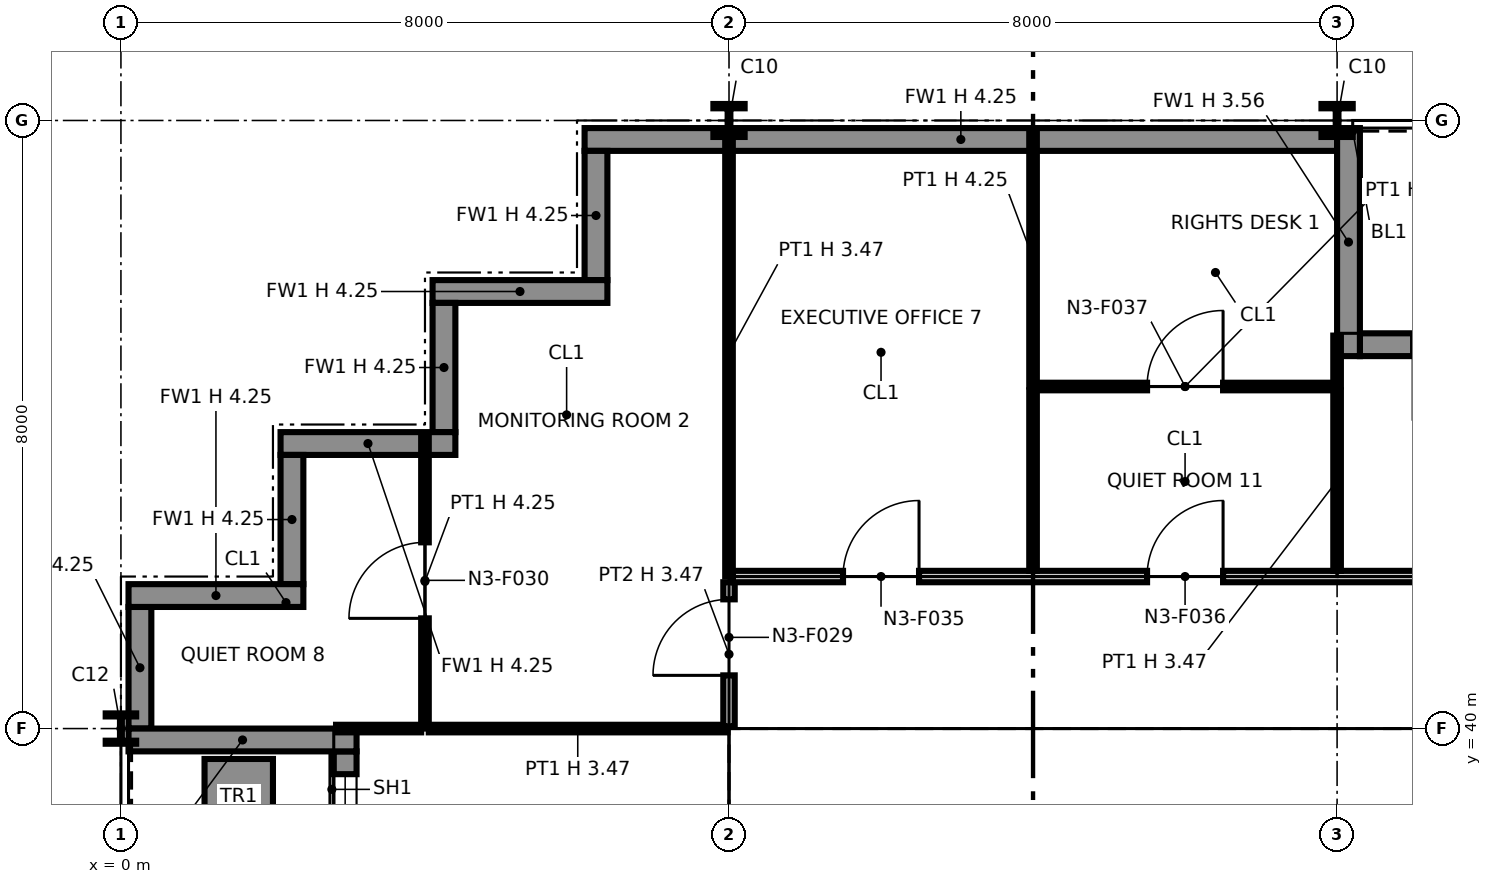
"""IFC4 building model, lengths in metres.
Left out: names, types, materials, properties, quantities, classifications, styles, units other than length and angle.
Written with IfcOpenShell. Run it as: python <this file> out.ifc"""

import sys

from ifc_helpers import new_model, si_unit, direction, frame, frame_2d, origin, origin_2d, place, context, subcontext, project, spatial, polyline, rectangle, i_section, outline, extrude, element, fill, save


model = new_model("IFC4")
c1 = context("Model", 3, precision=1e-05, world=origin(), true_north=direction((0.0, 1.0)))
c2 = subcontext(c1, "Body", "Model", "MODEL_VIEW")
j1 = project(units=[si_unit("LENGTHUNIT", "METRE"), si_unit("PLANEANGLEUNIT", "RADIAN")], contexts=[c1])
p1 = place(None, origin())
s1 = spatial("IfcSite", under=j1, at=p1, CompositionType="ELEMENT")
p2 = place(p1, origin())
s2 = spatial("IfcBuilding", under=s1, at=p2, CompositionType="ELEMENT")
p3 = place(p2, frame((0.0, 0.0, 65.6)))
s3 = spatial("IfcBuildingStorey", under=s2, at=p3, CompositionType="ELEMENT", Elevation=65.6)
p4 = place(p3, frame((0.0, 40.0, 0.0), z_axis=(0.0, 0.0, 1.0), x_axis=(1.0, 0.0, 0.0)))
e1 = element("IfcColumn", 1, at=p4, inside=s3, PredefinedType="COLUMN", context=c2, shape_type="SweptSolid", body=[
    extrude(i_section(OverallWidth=0.401, OverallDepth=0.399, WebThickness=0.025, FlangeThickness=0.04, at=origin_2d()), origin(), (0.0, 0.0, 1.0), 4.25),
])
p5 = place(p3, frame((8.0, 40.0, 0.0), z_axis=(0.0, 0.0, 1.0), x_axis=(1.0, 0.0, 0.0)))
e2 = element("IfcColumn", 2, at=p5, inside=s3, PredefinedType="COLUMN", context=c2, shape_type="SweptSolid", body=[
    extrude(i_section(OverallWidth=0.394, OverallDepth=0.376, WebThickness=0.017, FlangeThickness=0.028, at=origin_2d()), origin(), (0.0, 0.0, 1.0), 4.25),
])
p6 = place(p3, frame((8.0, 48.0, 0.0), z_axis=(0.0, 0.0, 1.0), x_axis=(1.0, 0.0, 0.0)))
e3 = element("IfcColumn", 3, at=p6, inside=s3, PredefinedType="COLUMN", context=c2, shape_type="SweptSolid", body=[
    extrude(i_section(OverallWidth=0.411, OverallDepth=0.434, WebThickness=0.036, FlangeThickness=0.057, at=origin_2d()), origin(), (0.0, 0.0, 1.0), 4.25),
])
p7 = place(p3, frame((16.0, 40.0, 0.0), z_axis=(0.0, 0.0, 1.0), x_axis=(1.0, 0.0, 0.0)))
e4 = element("IfcColumn", 4, at=p7, inside=s3, PredefinedType="COLUMN", context=c2, shape_type="SweptSolid", body=[
    extrude(i_section(OverallWidth=0.394, OverallDepth=0.376, WebThickness=0.017, FlangeThickness=0.028, at=origin_2d()), origin(), (0.0, 0.0, 1.0), 4.25),
])
p8 = place(p3, frame((16.0, 48.0, 0.0), z_axis=(0.0, 0.0, 1.0), x_axis=(1.0, 0.0, 0.0)))
e5 = element("IfcColumn", 5, at=p8, inside=s3, PredefinedType="COLUMN", context=c2, shape_type="SweptSolid", body=[
    extrude(i_section(OverallWidth=0.411, OverallDepth=0.434, WebThickness=0.036, FlangeThickness=0.057, at=origin_2d()), origin(), (0.0, 0.0, 1.0), 4.25),
])
p9 = place(p3, frame((0.25, 41.6, 0.0), z_axis=(0.0, 0.0, 1.0), x_axis=(0.0, -1.0, 0.0)))
e6 = element("IfcWall", 6, at=p9, inside=s3, PredefinedType="SOLIDWALL", context=c2, shape_type="SweptSolid", body=[
    extrude(rectangle(XDim=1.6, YDim=0.3, at=frame_2d((0.8, 0.0))), origin(), (0.0, 0.0, 1.0), 4.25),
])
p10 = place(p3, frame((2.95, 39.7, 0.0), z_axis=(0.0, 0.0, 1.0), x_axis=(0.0, -1.0, 0.0)))
e7 = element("IfcWall", 7, at=p10, inside=s3, PredefinedType="SOLIDWALL", context=c2, shape_type="SweptSolid", body=[
    extrude(rectangle(XDim=7.4, YDim=0.3, at=frame_2d((3.7, 0.0))), origin(), (0.0, 0.0, 1.0), 4.25),
])
p11 = place(p10, frame((0.3, 0.0, 0.9)))
e8 = element("IfcOpeningElement", 8, at=p11, cuts=e7, PredefinedType="OPENING", context=c2, shape_type="SweptSolid", body=[
    extrude(rectangle(XDim=2.8, YDim=2.2, at=frame_2d((1.4, 1.1))), frame((0.0, 0.16, 0.0), z_axis=(0.0, -1.0, 0.0), x_axis=(1.0, 0.0, 0.0)), (0.0, 0.0, 1.0), 0.32),
])
p12 = place(p10, frame((4.7, 0.0, 0.0)))
e9 = element("IfcOpeningElement", 9, at=p12, cuts=e7, PredefinedType="OPENING", context=c2, shape_type="SweptSolid", body=[
    extrude(rectangle(XDim=2.0, YDim=2.4, at=frame_2d((1.0, 1.2))), frame((0.0, 0.16, 0.0), z_axis=(0.0, -1.0, 0.0), x_axis=(1.0, 0.0, 0.0)), (0.0, 0.0, 1.0), 0.32),
])
p13 = place(p3, frame((0.1, 39.85, 0.0), z_axis=(0.0, 0.0, 1.0), x_axis=(1.0, 0.0, 0.0)))
e10 = element("IfcWall", 10, at=p13, inside=s3, PredefinedType="SOLIDWALL", context=c2, shape_type="SweptSolid", body=[
    extrude(rectangle(XDim=3.0, YDim=0.3, at=frame_2d((1.5, 0.0))), origin(), (0.0, 0.0, 1.0), 3.469),
])
p14 = place(p3, frame((1.55, 39.6, 0.0), z_axis=(0.0, 0.0, 1.0), x_axis=(0.0, -1.0, 0.0)))
e11 = element("IfcWall", 11, at=p14, inside=s3, PredefinedType="SOLIDWALL", context=c2, shape_type="SweptSolid", body=[
    extrude(rectangle(XDim=3.2, YDim=0.9, at=frame_2d((1.6, 0.0))), origin(), (0.0, 0.0, 1.0), 0.6),
])
p15 = place(p3, frame((23.7, 45.05, 0.0), z_axis=(0.0, 0.0, 1.0), x_axis=(-1.0, 0.0, 0.0)))
e12 = element("IfcWall", 12, at=p15, inside=s3, PredefinedType="SOLIDWALL", context=c2, shape_type="SweptSolid", body=[
    extrude(rectangle(XDim=7.4, YDim=0.3, at=frame_2d((3.7, 0.0))), origin(), (0.0, 0.0, 1.0), 4.25),
])
p16 = place(p15, frame((0.3, 0.0, 0.9)))
e13 = element("IfcOpeningElement", 13, at=p16, cuts=e12, PredefinedType="OPENING", context=c2, shape_type="SweptSolid", body=[
    extrude(rectangle(XDim=2.8, YDim=2.2, at=frame_2d((1.4, 1.1))), frame((0.0, 0.16, 0.0), z_axis=(0.0, -1.0, 0.0), x_axis=(1.0, 0.0, 0.0)), (0.0, 0.0, 1.0), 0.32),
])
p17 = place(p15, frame((4.7, 0.0, 0.0)))
e14 = element("IfcOpeningElement", 14, at=p17, cuts=e12, PredefinedType="OPENING", context=c2, shape_type="SweptSolid", body=[
    extrude(rectangle(XDim=2.0, YDim=2.4, at=frame_2d((1.0, 1.2))), frame((0.0, 0.16, 0.0), z_axis=(0.0, -1.0, 0.0), x_axis=(1.0, 0.0, 0.0)), (0.0, 0.0, 1.0), 0.32),
])
p18 = place(p3, frame((16.15, 47.9, 0.0), z_axis=(0.0, 0.0, 1.0), x_axis=(0.0, -1.0, 0.0)))
e15 = element("IfcWall", 15, at=p18, inside=s3, PredefinedType="SOLIDWALL", context=c2, shape_type="SweptSolid", body=[
    extrude(rectangle(XDim=3.0, YDim=0.3, at=frame_2d((1.5, 0.0))), origin(), (0.0, 0.0, 1.0), 3.556),
])
p19 = place(p3, frame((16.0, 47.75, 0.0), z_axis=(0.0, 0.0, 1.0), x_axis=(-1.0, 0.0, 0.0)))
e16 = element("IfcWall", 16, at=p19, inside=s3, PredefinedType="SOLIDWALL", context=c2, shape_type="SweptSolid", body=[
    extrude(rectangle(XDim=9.9, YDim=0.3, at=frame_2d((4.95, 0.0))), origin(), (0.0, 0.0, 1.0), 4.25),
])
p20 = place(p3, frame((6.25, 47.6, 0.0), z_axis=(0.0, 0.0, 1.0), x_axis=(0.0, -1.0, 0.0)))
e17 = element("IfcWall", 17, at=p20, inside=s3, PredefinedType="SOLIDWALL", context=c2, shape_type="SweptSolid", body=[
    extrude(rectangle(XDim=1.7, YDim=0.3, at=frame_2d((0.85, 0.0))), origin(), (0.0, 0.0, 1.0), 4.25),
])
p21 = place(p3, frame((6.4, 45.75, 0.0), z_axis=(0.0, 0.0, 1.0), x_axis=(-1.0, 0.0, 0.0)))
e18 = element("IfcWall", 18, at=p21, inside=s3, PredefinedType="SOLIDWALL", context=c2, shape_type="SweptSolid", body=[
    extrude(rectangle(XDim=2.3, YDim=0.3, at=frame_2d((1.15, 0.0))), origin(), (0.0, 0.0, 1.0), 4.25),
])
p22 = place(p3, frame((4.25, 45.6, 0.0), z_axis=(0.0, 0.0, 1.0), x_axis=(0.0, -1.0, 0.0)))
e19 = element("IfcWall", 19, at=p22, inside=s3, PredefinedType="SOLIDWALL", context=c2, shape_type="SweptSolid", body=[
    extrude(rectangle(XDim=1.7, YDim=0.3, at=frame_2d((0.85, 0.0))), origin(), (0.0, 0.0, 1.0), 4.25),
])
p23 = place(p3, frame((4.4, 43.75, 0.0), z_axis=(0.0, 0.0, 1.0), x_axis=(-1.0, 0.0, 0.0)))
e20 = element("IfcWall", 20, at=p23, inside=s3, PredefinedType="SOLIDWALL", context=c2, shape_type="SweptSolid", body=[
    extrude(rectangle(XDim=2.3, YDim=0.3, at=frame_2d((1.15, 0.0))), origin(), (0.0, 0.0, 1.0), 4.25),
])
p24 = place(p3, frame((2.25, 43.6, 0.0), z_axis=(0.0, 0.0, 1.0), x_axis=(0.0, -1.0, 0.0)))
e21 = element("IfcWall", 21, at=p24, inside=s3, PredefinedType="SOLIDWALL", context=c2, shape_type="SweptSolid", body=[
    extrude(rectangle(XDim=1.7, YDim=0.3, at=frame_2d((0.85, 0.0))), origin(), (0.0, 0.0, 1.0), 4.25),
])
p25 = place(p3, frame((2.4, 41.75, 0.0), z_axis=(0.0, 0.0, 1.0), x_axis=(-1.0, 0.0, 0.0)))
e22 = element("IfcWall", 22, at=p25, inside=s3, PredefinedType="SOLIDWALL", context=c2, shape_type="SweptSolid", body=[
    extrude(rectangle(XDim=2.3, YDim=0.3, at=frame_2d((1.15, 0.0))), origin(), (0.0, 0.0, 1.0), 4.25),
])
p26 = place(p3, frame((8.75, 32.85, 0.0), z_axis=(0.0, 0.0, 1.0), x_axis=(0.0, 1.0, 0.0)))
e23 = element("IfcWall", 23, at=p26, inside=s3, PredefinedType="PARTITIONING", context=c2, shape_type="SweptSolid", body=[
    extrude(outline(polyline([(0.0, 0.0), (6.3, 0.0), (6.3, 4.25), (3.231, 4.25), (3.23, 3.789), (3.07, 3.789), (3.069, 4.25), (0.0, 4.25), (0.0, 0.0)])), frame((0.0, 0.1, 0.0), z_axis=(0.0, -1.0, 0.0), x_axis=(1.0, 0.0, 0.0)), (0.0, 0.0, 1.0), 0.2),
])
p27 = place(p3, frame((8.65, 39.25, 0.0), z_axis=(0.0, 0.0, 1.0), x_axis=(1.0, 0.0, 0.0)))
e24 = element("IfcWall", 24, at=p27, inside=s3, PredefinedType="PARTITIONING", context=c2, shape_type="SweptSolid", body=[
    extrude(outline(polyline([(0.0, 0.0), (14.7, 0.0), (14.7, 4.25), (7.469, 4.25), (7.469, 3.632), (7.231, 3.632), (7.23, 4.25), (0.0, 4.25), (0.0, 0.0)])), frame((0.0, 0.1, 0.0), z_axis=(0.0, -1.0, 0.0), x_axis=(1.0, 0.0, 0.0)), (0.0, 0.0, 1.0), 0.2),
])
for number, where, z_axis, x_axis in (
    (25, (11.875, 34.95, 0.0), (0.0, 0.0, 1.0), (0.0, 1.0, 0.0)),
    (26, (13.925, 34.95, 0.0), (0.0, 0.0, 1.0), (0.0, 1.0, 0.0)),
):
    element("IfcWall", number, at=place(p3, frame(where, z_axis=z_axis, x_axis=x_axis)), inside=s3, PredefinedType="PARTITIONING", context=c2, shape_type="SweptSolid", body=[
        extrude(outline(polyline([(0.0, 0.0), (4.2, 0.0), (4.2, 4.25), (1.132, 4.25), (1.131, 3.789), (0.969, 3.789), (0.969, 4.25), (0.0, 4.25), (0.0, 0.0)])), frame((0.0, 0.075, 0.0), z_axis=(0.0, -1.0, 0.0), x_axis=(1.0, 0.0, 0.0)), (0.0, 0.0, 1.0), 0.15),
    ])
p28 = place(p3, frame((16.0, 34.95, 0.0), z_axis=(0.0, 0.0, 1.0), x_axis=(0.0, 1.0, 0.0)))
e27 = element("IfcWall", 27, at=p28, inside=s3, PredefinedType="PARTITIONING", context=c2, shape_type="SweptSolid", body=[
    extrude(rectangle(XDim=4.2, YDim=0.6, at=frame_2d((2.1, 0.0))), origin(), (0.0, 0.0, 1.0), 3.632),
])
p29 = place(p3, frame((2.83, 40.0, 0.0), z_axis=(0.0, 0.0, 1.0), x_axis=(1.0, 0.0, 0.0)))
e28 = element("IfcWall", 28, at=p29, inside=s3, PredefinedType="PARTITIONING", context=c2, shape_type="SweptSolid", body=[
    extrude(rectangle(XDim=1.12, YDim=0.1, at=frame_2d((0.56, 0.0))), origin(), (0.0, 0.0, 1.0), 3.47),
])
p30 = place(p3, frame((4.05, 40.0, 0.0), z_axis=(0.0, 0.0, 1.0), x_axis=(1.0, 0.0, 0.0)))
e29 = element("IfcWall", 29, at=p30, inside=s3, PredefinedType="PARTITIONING", context=c2, shape_type="SweptSolid", body=[
    extrude(rectangle(XDim=3.92, YDim=0.1, at=frame_2d((1.96, 0.0))), origin(), (0.0, 0.0, 1.0), 3.47),
])
p31 = place(p3, frame((4.0, 40.0, 0.0), z_axis=(0.0, 0.0, 1.0), x_axis=(0.0, 1.0, 0.0)))
e30 = element("IfcWall", 30, at=p31, inside=s3, PredefinedType="PARTITIONING", context=c2, shape_type="SweptSolid", body=[
    extrude(rectangle(XDim=3.87, YDim=0.1, at=frame_2d((1.935, 0.0))), origin(), (0.0, 0.0, 1.0), 4.25),
])
p32 = place(p31, frame((1.45, 0.0, 0.0)))
e31 = element("IfcOpeningElement", 31, at=p32, cuts=e30, PredefinedType="OPENING", context=c2, shape_type="SweptSolid", body=[
    extrude(rectangle(XDim=1.0, YDim=2.1, at=frame_2d((0.5, 1.05))), frame((0.0, 0.06, 0.0), z_axis=(0.0, -1.0, 0.0), x_axis=(1.0, 0.0, 0.0)), (0.0, 0.0, 1.0), 0.12),
])
p33 = place(p3, frame((8.0, 40.03, 0.0), z_axis=(0.0, 0.0, 1.0), x_axis=(0.0, 1.0, 0.0)))
e32 = element("IfcWall", 32, at=p33, inside=s3, PredefinedType="PARTITIONING", context=c2, shape_type="SweptSolid", body=[
    extrude(rectangle(XDim=1.895, YDim=0.15, at=frame_2d((0.948, 0.0))), origin(), (0.0, 0.0, 1.0), 3.47),
])
p34 = place(p33, frame((0.67, 0.0, 0.0)))
e33 = element("IfcOpeningElement", 33, at=p34, cuts=e32, PredefinedType="OPENING", context=c2, shape_type="SweptSolid", body=[
    extrude(rectangle(XDim=1.0, YDim=2.1, at=frame_2d((0.5, 1.05))), frame((0.0, 0.085, 0.0), z_axis=(0.0, -1.0, 0.0), x_axis=(1.0, 0.0, 0.0)), (0.0, 0.0, 1.0), 0.17),
])
p35 = place(p3, frame((8.05, 42.0, 0.0), z_axis=(0.0, 0.0, 1.0), x_axis=(1.0, 0.0, 0.0)))
e34 = element("IfcWall", 34, at=p35, inside=s3, PredefinedType="PARTITIONING", context=c2, shape_type="SweptSolid", body=[
    extrude(rectangle(XDim=33.95, YDim=0.15, at=frame_2d((16.975, 0.0))), origin(), (0.0, 0.0, 1.0), 4.25),
])
p36 = place(p35, frame((9.45, 0.0, 0.0)))
e35 = element("IfcOpeningElement", 35, at=p36, cuts=e34, PredefinedType="OPENING", context=c2, shape_type="SweptSolid", body=[
    extrude(rectangle(XDim=1.0, YDim=2.1, at=frame_2d((0.5, 1.05))), frame((0.0, 0.085, 0.0), z_axis=(0.0, -1.0, 0.0), x_axis=(1.0, 0.0, 0.0)), (0.0, 0.0, 1.0), 0.17),
])
p37 = place(p35, frame((13.45, 0.0, 0.0)))
e36 = element("IfcOpeningElement", 36, at=p37, cuts=e34, PredefinedType="OPENING", context=c2, shape_type="SweptSolid", body=[
    extrude(rectangle(XDim=1.0, YDim=2.1, at=frame_2d((0.5, 1.05))), frame((0.0, 0.085, 0.0), z_axis=(0.0, -1.0, 0.0), x_axis=(1.0, 0.0, 0.0)), (0.0, 0.0, 1.0), 0.17),
])
p38 = place(p35, frame((27.45, 0.0, 0.0)))
e37 = element("IfcOpeningElement", 37, at=p38, cuts=e34, PredefinedType="OPENING", context=c2, shape_type="SweptSolid", body=[
    extrude(rectangle(XDim=1.0, YDim=2.1, at=frame_2d((0.5, 1.05))), frame((0.0, 0.085, 0.0), z_axis=(0.0, -1.0, 0.0), x_axis=(1.0, 0.0, 0.0)), (0.0, 0.0, 1.0), 0.17),
])
p39 = place(p35, frame((1.45, 0.0, 0.0)))
e38 = element("IfcOpeningElement", 38, at=p39, cuts=e34, PredefinedType="OPENING", context=c2, shape_type="SweptSolid", body=[
    extrude(rectangle(XDim=1.0, YDim=2.1, at=frame_2d((0.5, 1.05))), frame((0.0, 0.085, 0.0), z_axis=(0.0, -1.0, 0.0), x_axis=(1.0, 0.0, 0.0)), (0.0, 0.0, 1.0), 0.17),
])
p40 = place(p35, frame((5.45, 0.0, 0.0)))
e39 = element("IfcOpeningElement", 39, at=p40, cuts=e34, PredefinedType="OPENING", context=c2, shape_type="SweptSolid", body=[
    extrude(rectangle(XDim=1.0, YDim=2.1, at=frame_2d((0.5, 1.05))), frame((0.0, 0.085, 0.0), z_axis=(0.0, -1.0, 0.0), x_axis=(1.0, 0.0, 0.0)), (0.0, 0.0, 1.0), 0.17),
])
p41 = place(p35, frame((17.45, 0.0, 0.0)))
e40 = element("IfcOpeningElement", 40, at=p41, cuts=e34, PredefinedType="OPENING", context=c2, shape_type="SweptSolid", body=[
    extrude(rectangle(XDim=1.0, YDim=2.1, at=frame_2d((0.5, 1.05))), frame((0.0, 0.085, 0.0), z_axis=(0.0, -1.0, 0.0), x_axis=(1.0, 0.0, 0.0)), (0.0, 0.0, 1.0), 0.17),
])
p42 = place(p35, frame((21.45, 0.0, 0.0)))
e41 = element("IfcOpeningElement", 41, at=p42, cuts=e34, PredefinedType="OPENING", context=c2, shape_type="SweptSolid", body=[
    extrude(rectangle(XDim=1.0, YDim=2.1, at=frame_2d((0.5, 1.05))), frame((0.0, 0.085, 0.0), z_axis=(0.0, -1.0, 0.0), x_axis=(1.0, 0.0, 0.0)), (0.0, 0.0, 1.0), 0.17),
])
p43 = place(p3, frame((8.0, 42.0, 0.0), z_axis=(0.0, 0.0, 1.0), x_axis=(0.0, 1.0, 0.0)))
e42 = element("IfcWall", 42, at=p43, inside=s3, PredefinedType="PARTITIONING", context=c2, shape_type="SweptSolid", body=[
    extrude(rectangle(XDim=5.87, YDim=0.1, at=frame_2d((2.935, 0.0))), origin(), (0.0, 0.0, 1.0), 3.47),
])
for number, where, z_axis, x_axis in (
    (43, (12.0, 42.075, 0.0), (0.0, 0.0, 1.0), (0.0, 1.0, 0.0)),
    (44, (16.0, 42.075, 0.0), (0.0, 0.0, 1.0), (0.0, 1.0, 0.0)),
):
    element("IfcWall", number, at=place(p3, frame(where, z_axis=z_axis, x_axis=x_axis)), inside=s3, PredefinedType="PARTITIONING", context=c2, shape_type="SweptSolid", body=[
        extrude(rectangle(XDim=2.375, YDim=0.1, at=frame_2d((1.188, 0.0))), origin(), (0.0, 0.0, 1.0), 3.47),
    ])
p44 = place(p3, frame((12.05, 44.5, 0.0), z_axis=(0.0, 0.0, 1.0), x_axis=(1.0, 0.0, 0.0)))
e45 = element("IfcWall", 45, at=p44, inside=s3, PredefinedType="PARTITIONING", context=c2, shape_type="SweptSolid", body=[
    extrude(rectangle(XDim=3.9, YDim=0.1, at=frame_2d((1.95, 0.0))), origin(), (0.0, 0.0, 1.0), 4.25),
])
p45 = place(p44, frame((1.45, 0.0, 0.0)))
e46 = element("IfcOpeningElement", 46, at=p45, cuts=e45, PredefinedType="OPENING", context=c2, shape_type="SweptSolid", body=[
    extrude(rectangle(XDim=1.0, YDim=2.1, at=frame_2d((0.5, 1.05))), frame((0.0, 0.06, 0.0), z_axis=(0.0, -1.0, 0.0), x_axis=(1.0, 0.0, 0.0)), (0.0, 0.0, 1.0), 0.12),
])
p46 = place(p3, frame((12.0, 44.5, 0.0), z_axis=(0.0, 0.0, 1.0), x_axis=(0.0, 1.0, 0.0)))
e47 = element("IfcWall", 47, at=p46, inside=s3, PredefinedType="PARTITIONING", context=c2, shape_type="SweptSolid", body=[
    extrude(rectangle(XDim=3.37, YDim=0.1, at=frame_2d((1.685, 0.0))), origin(), (0.0, 0.0, 1.0), 4.25),
])
p47 = place(p3, frame((16.0, 44.5, 0.0), z_axis=(0.0, 0.0, 1.0), x_axis=(0.0, 1.0, 0.0)))
e48 = element("IfcWall", 48, at=p47, inside=s3, PredefinedType="PARTITIONING", context=c2, shape_type="SweptSolid", body=[
    extrude(rectangle(XDim=0.67, YDim=0.1, at=frame_2d((0.335, 0.0))), origin(), (0.0, 0.0, 1.0), 3.47),
])
p48 = place(p11, origin())
e49 = element("IfcWindow", 49, at=p48, inside=s3, PartitioningType="SINGLE_PANEL", PredefinedType="WINDOW", context=c2, shape_type="SweptSolid", body=[
    extrude(rectangle(XDim=2.8, YDim=2.2, at=frame_2d((1.4, 1.1))), frame((0.0, 0.03, 0.0), z_axis=(0.0, -1.0, 0.0), x_axis=(1.0, 0.0, 0.0)), (0.0, 0.0, 1.0), 0.06),
])
fill(e8, e49)
p49 = place(p34, origin())
e50 = element("IfcDoor", 50, at=p49, inside=s3, OperationType="SINGLE_SWING_LEFT", PredefinedType="DOOR", context=c2, shape_type="SweptSolid", body=[
    extrude(rectangle(XDim=1.0, YDim=2.1, at=frame_2d((0.5, 1.05))), frame((0.0, 0.025, 0.0), z_axis=(0.0, -1.0, 0.0), x_axis=(1.0, 0.0, 0.0)), (0.0, 0.0, 1.0), 0.05),
])
fill(e33, e50)
p50 = place(p32, origin())
e51 = element("IfcDoor", 51, at=p50, inside=s3, OperationType="SINGLE_SWING_LEFT", PredefinedType="DOOR", context=c2, shape_type="SweptSolid", body=[
    extrude(rectangle(XDim=1.0, YDim=2.1, at=frame_2d((0.5, 1.05))), frame((0.0, 0.025, 0.0), z_axis=(0.0, -1.0, 0.0), x_axis=(1.0, 0.0, 0.0)), (0.0, 0.0, 1.0), 0.05),
])
fill(e31, e51)
p51 = place(p39, origin())
e52 = element("IfcDoor", 52, at=p51, inside=s3, OperationType="SINGLE_SWING_RIGHT", PredefinedType="DOOR", context=c2, shape_type="SweptSolid", body=[
    extrude(rectangle(XDim=1.0, YDim=2.1, at=frame_2d((0.5, 1.05))), frame((0.0, 0.025, 0.0), z_axis=(0.0, -1.0, 0.0), x_axis=(1.0, 0.0, 0.0)), (0.0, 0.0, 1.0), 0.05),
])
fill(e38, e52)
p52 = place(p40, origin())
e53 = element("IfcDoor", 53, at=p52, inside=s3, OperationType="SINGLE_SWING_RIGHT", PredefinedType="DOOR", context=c2, shape_type="SweptSolid", body=[
    extrude(rectangle(XDim=1.0, YDim=2.1, at=frame_2d((0.5, 1.05))), frame((0.0, 0.025, 0.0), z_axis=(0.0, -1.0, 0.0), x_axis=(1.0, 0.0, 0.0)), (0.0, 0.0, 1.0), 0.05),
])
fill(e39, e53)
p53 = place(p45, origin())
e54 = element("IfcDoor", 54, at=p53, inside=s3, OperationType="SINGLE_SWING_RIGHT", PredefinedType="DOOR", context=c2, shape_type="SweptSolid", body=[
    extrude(rectangle(XDim=1.0, YDim=2.1, at=frame_2d((0.5, 1.05))), frame((0.0, 0.025, 0.0), z_axis=(0.0, -1.0, 0.0), x_axis=(1.0, 0.0, 0.0)), (0.0, 0.0, 1.0), 0.05),
])
fill(e46, e54)
save(model, sys.argv[1])
